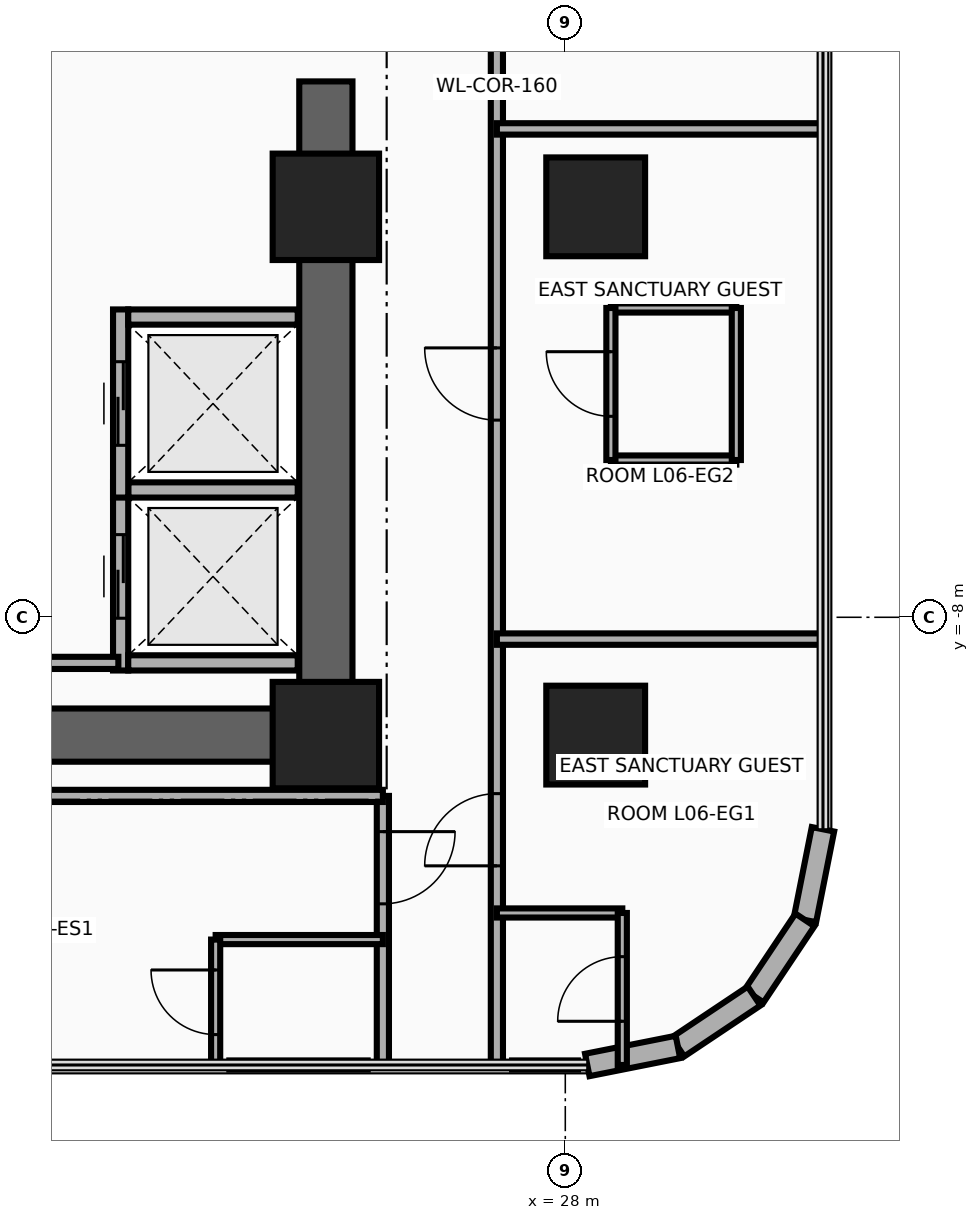
"""IFC4 building model, lengths in metres.
Left out: names, types, materials, properties, quantities, classifications, styles, units other than length and angle.
Written with IfcOpenShell. Run it as: python <this file> out.ifc"""

import sys

from ifc_helpers import new_model, si_unit, direction, frame, frame_2d, origin, origin_2d, place, context, subcontext, project, spatial, rectangle, circle, extrude, source, transform, mapped, element, fill, save


model = new_model("IFC4")
c1 = context("Model", 3, precision=1e-05, world=origin(), true_north=direction((0.0, 1.0)))
c2 = subcontext(c1, "Body", "Model", "MODEL_VIEW")
j1 = project(units=[si_unit("LENGTHUNIT", "METRE"), si_unit("PLANEANGLEUNIT", "RADIAN")], contexts=[c1])
p1 = place(None, origin())
s1 = spatial("IfcSite", under=j1, at=p1, CompositionType="ELEMENT")
p2 = place(p1, origin())
s2 = spatial("IfcBuilding", under=s1, at=p2, CompositionType="ELEMENT")
p3 = place(p2, frame((0.0, 0.0, 29.7)))
s3 = spatial("IfcBuildingStorey", under=s2, at=p3, CompositionType="ELEMENT", Elevation=29.7)
p4 = place(p3, frame((24.85, -9.9, 0.0), z_axis=(0.0, 0.0, 1.0), x_axis=(0.0, 1.0, 0.0)))
e1 = element("IfcWall", 1, at=p4, inside=s3, PredefinedType="SHEAR", context=c2, shape_type="SweptSolid", body=[
    extrude(rectangle(XDim=8.95, YDim=0.7, at=frame_2d((4.475, 0.0))), origin(), (0.0, 0.0, 1.0), 3.46),
])
p5 = place(p3, frame((15.85, -9.55, 0.0), z_axis=(0.0, 0.0, 1.0), x_axis=(1.0, 0.0, 0.0)))
e2 = element("IfcWall", 2, at=p5, inside=s3, PredefinedType="SHEAR", context=c2, shape_type="SweptSolid", body=[
    extrude(rectangle(XDim=9.0, YDim=0.7, at=frame_2d((4.5, 0.0))), origin(), (0.0, 0.0, 1.0), 3.46),
])
m1 = source(origin(), c2, "Body", "SweptSolid", [
    extrude(rectangle(XDim=1.4, YDim=1.4, at=origin_2d()), origin(), (0.0, 0.0, 1.0), 3.7),
])
p6 = place(p3, frame((24.85, -9.55, 0.0), z_axis=(0.0, 0.0, 1.0), x_axis=(1.0, 0.0, 0.0)))
e3 = element("IfcColumn", 3, at=p6, inside=s3, PredefinedType="COLUMN", context=c2, shape_type="MappedRepresentation", body=[
    mapped(m1, transform((0.0, 0.0, 0.0), x_axis=(1.0, 0.0, 0.0), y_axis=(0.0, 1.0, 0.0), z_axis=(0.0, 0.0, 1.0), scale=1.0)),
])
m2 = source(origin(), c2, "Body", "SweptSolid", [
    extrude(circle(Radius=0.65, at=origin_2d()), origin(), (0.0, 0.0, 1.0), 3.7),
])
p7 = place(p3, frame((28.4, -9.55, 0.0), z_axis=(0.0, 0.0, 1.0), x_axis=(1.0, 0.0, 0.0)))
e4 = element("IfcColumn", 4, at=p7, inside=s3, PredefinedType="COLUMN", context=c2, shape_type="MappedRepresentation", body=[
    mapped(m2, transform((0.0, 0.0, 0.0), x_axis=(1.0, 0.0, 0.0), y_axis=(0.0, 1.0, 0.0), z_axis=(0.0, 0.0, 1.0), scale=1.0)),
])
p8 = place(p3, frame((24.85, -2.6, 0.0), z_axis=(0.0, 0.0, 1.0), x_axis=(1.0, 0.0, 0.0)))
e5 = element("IfcColumn", 5, at=p8, inside=s3, PredefinedType="COLUMN", context=c2, shape_type="MappedRepresentation", body=[
    mapped(m1, transform((0.0, 0.0, 0.0), x_axis=(1.0, 0.0, 0.0), y_axis=(0.0, 1.0, 0.0), z_axis=(0.0, 0.0, 1.0), scale=1.0)),
])
p9 = place(p3, frame((28.4, -2.6, 0.0), z_axis=(0.0, 0.0, 1.0), x_axis=(1.0, 0.0, 0.0)))
e6 = element("IfcColumn", 6, at=p9, inside=s3, PredefinedType="COLUMN", context=c2, shape_type="MappedRepresentation", body=[
    mapped(m2, transform((0.0, 0.0, 0.0), x_axis=(1.0, 0.0, 0.0), y_axis=(0.0, 1.0, 0.0), z_axis=(0.0, 0.0, 1.0), scale=1.0)),
])
p10 = place(p3, frame((31.39, -10.789, 0.0), z_axis=(0.0, 0.0, 1.0), x_axis=(-0.194996050505, -0.980804027463, 0.0)))
e7 = element("IfcWall", 7, at=p10, inside=s3, PredefinedType="SOLIDWALL", context=c2, shape_type="SweptSolid", body=[
    extrude(rectangle(XDim=1.216, YDim=0.3, at=frame_2d((0.608, 0.0))), origin(), (0.0, 0.0, 1.0), 3.46),
])
for number, where, z_axis, x_axis in (
    (8, (31.153, -11.982, 0.0), (0.0, 0.0, 1.0), (-0.556, -0.831, 0.0)),
    (9, (30.483, -12.983, 0.0), (0.0, 0.0, 1.0), (-0.831, -0.556, 0.0)),
):
    element("IfcWall", number, at=place(p3, frame(where, z_axis=z_axis, x_axis=x_axis)), inside=s3, PredefinedType="SOLIDWALL", context=c2, shape_type="SweptSolid", body=[
        extrude(rectangle(XDim=1.205, YDim=0.3, at=frame_2d((0.603, 0.0))), origin(), (0.0, 0.0, 1.0), 3.46),
    ])
p11 = place(p3, frame((29.482, -13.653, 0.0), z_axis=(0.0, 0.0, 1.0), x_axis=(-0.980804027463, -0.194996050505, 0.0)))
e10 = element("IfcWall", 10, at=p11, inside=s3, PredefinedType="SOLIDWALL", context=c2, shape_type="SweptSolid", body=[
    extrude(rectangle(XDim=1.216, YDim=0.3, at=frame_2d((0.608, 0.0))), origin(), (0.0, 0.0, 1.0), 3.46),
])
p12 = place(p3, frame((22.15, -8.7, 0.0), z_axis=(0.0, 0.0, 1.0), x_axis=(0.0, 1.0, 0.0)))
e11 = element("IfcWall", 11, at=p12, inside=s3, PredefinedType="MOVABLE", context=c2, shape_type="SweptSolid", body=[
    extrude(rectangle(XDim=2.475, YDim=0.2, at=frame_2d((1.237, 0.0))), origin(), (0.0, 0.0, 1.0), 3.46),
])
p13 = place(p12, frame((0.688, 0.0, 0.0)))
e12 = element("IfcOpeningElement", 12, at=p13, cuts=e11, PredefinedType="OPENING", context=c2, shape_type="SweptSolid", body=[
    extrude(rectangle(XDim=1.1, YDim=2.1, at=frame_2d((0.55, 1.05))), frame((0.0, 0.115, 0.0), z_axis=(0.0, -1.0, 0.0), x_axis=(1.0, 0.0, 0.0)), (0.0, 0.0, 1.0), 0.23),
])
for number, where, z_axis, x_axis in (
    (13, (22.25, -8.6, 0.0), (0.0, 0.0, 1.0), (1.0, 0.0, 0.0)),
    (14, (22.25, -6.325, 0.0), (0.0, 0.0, 1.0), (1.0, 0.0, 0.0)),
):
    element("IfcWall", number, at=place(p3, frame(where, z_axis=z_axis, x_axis=x_axis)), inside=s3, PredefinedType="MOVABLE", context=c2, shape_type="SweptSolid", body=[
        extrude(rectangle(XDim=2.23, YDim=0.2, at=frame_2d((1.115, 0.0))), origin(), (0.0, 0.0, 1.0), 3.46),
    ])
p14 = place(p3, frame((22.15, -6.425, 0.0), z_axis=(0.0, 0.0, 1.0), x_axis=(0.0, 1.0, 0.0)))
e15 = element("IfcWall", 15, at=p14, inside=s3, PredefinedType="MOVABLE", context=c2, shape_type="SweptSolid", body=[
    extrude(rectangle(XDim=2.475, YDim=0.2, at=frame_2d((1.238, 0.0))), origin(), (0.0, 0.0, 1.0), 3.46),
])
p15 = place(p14, frame((0.688, 0.0, 0.0)))
e16 = element("IfcOpeningElement", 16, at=p15, cuts=e15, PredefinedType="OPENING", context=c2, shape_type="SweptSolid", body=[
    extrude(rectangle(XDim=1.1, YDim=2.1, at=frame_2d((0.55, 1.05))), frame((0.0, 0.115, 0.0), z_axis=(0.0, -1.0, 0.0), x_axis=(1.0, 0.0, 0.0)), (0.0, 0.0, 1.0), 0.23),
])
p16 = place(p3, frame((22.25, -4.05, 0.0), z_axis=(0.0, 0.0, 1.0), x_axis=(1.0, 0.0, 0.0)))
e17 = element("IfcWall", 17, at=p16, inside=s3, PredefinedType="MOVABLE", context=c2, shape_type="SweptSolid", body=[
    extrude(rectangle(XDim=2.23, YDim=0.2, at=frame_2d((1.115, 0.0))), origin(), (0.0, 0.0, 1.0), 3.46),
])
p17 = place(p3, frame((20.3, -8.6, 0.0), z_axis=(0.0, 0.0, 1.0), x_axis=(1.0, 0.0, 0.0)))
e18 = element("IfcWall", 18, at=p17, inside=s3, PredefinedType="PARTITIONING", context=c2, shape_type="SweptSolid", body=[
    extrude(rectangle(XDim=1.82, YDim=0.16, at=frame_2d((0.91, 0.0))), origin(), (0.0, 0.0, 1.0), 3.46),
])
p18 = place(p3, frame((25.6, -13.89, 0.0), z_axis=(0.0, 0.0, 1.0), x_axis=(0.0, 1.0, 0.0)))
e19 = element("IfcWall", 19, at=p18, inside=s3, PredefinedType="PARTITIONING", context=c2, shape_type="SweptSolid", body=[
    extrude(rectangle(XDim=3.54, YDim=0.16, at=frame_2d((1.77, 0.0))), origin(), (0.0, 0.0, 1.0), 3.46),
])
p19 = place(p18, frame((2.12, 0.0, 0.0)))
e20 = element("IfcOpeningElement", 20, at=p19, cuts=e19, PredefinedType="OPENING", context=c2, shape_type="SweptSolid", body=[
    extrude(rectangle(XDim=0.95, YDim=2.15, at=frame_2d((0.475, 1.075))), frame((0.0, 0.095, 0.0), z_axis=(0.0, -1.0, 0.0), x_axis=(1.0, 0.0, 0.0)), (0.0, 0.0, 1.0), 0.19),
])
p20 = place(p3, frame((13.41, -10.35, 0.0), z_axis=(0.0, 0.0, 1.0), x_axis=(1.0, 0.0, 0.0)))
e21 = element("IfcWall", 21, at=p20, inside=s3, PredefinedType="PARTITIONING", context=c2, shape_type="SweptSolid", body=[
    extrude(rectangle(XDim=12.19, YDim=0.16, at=frame_2d((6.095, 0.0))), origin(), (0.0, 0.0, 1.0), 3.46),
])
p21 = place(p3, frame((23.4, -12.24, 0.0), z_axis=(0.0, 0.0, 1.0), x_axis=(1.0, 0.0, 0.0)))
e22 = element("IfcWall", 22, at=p21, inside=s3, PredefinedType="PARTITIONING", context=c2, shape_type="SweptSolid", body=[
    extrude(rectangle(XDim=2.2, YDim=0.12, at=frame_2d((1.1, 0.0))), origin(), (0.0, 0.0, 1.0), 3.46),
])
p22 = place(p3, frame((23.4, -13.89, 0.0), z_axis=(0.0, 0.0, 1.0), x_axis=(0.0, 1.0, 0.0)))
e23 = element("IfcWall", 23, at=p22, inside=s3, PredefinedType="PARTITIONING", context=c2, shape_type="SweptSolid", body=[
    extrude(rectangle(XDim=1.65, YDim=0.12, at=frame_2d((0.825, 0.0))), origin(), (0.0, 0.0, 1.0), 3.46),
])
p23 = place(p22, frame((0.4, 0.0, 0.0)))
e24 = element("IfcOpeningElement", 24, at=p23, cuts=e23, PredefinedType="OPENING", context=c2, shape_type="SweptSolid", body=[
    extrude(rectangle(XDim=0.85, YDim=2.1, at=frame_2d((0.425, 1.05))), frame((0.0, 0.075, 0.0), z_axis=(0.0, -1.0, 0.0), x_axis=(1.0, 0.0, 0.0)), (0.0, 0.0, 1.0), 0.15),
])
p24 = place(p3, frame((23.58, -13.89, 0.0), z_axis=(0.0, 0.0, 1.0), x_axis=(1.0, 0.0, 0.0)))
e25 = element("IfcWall", 25, at=p24, inside=s3, PredefinedType="PARTITIONING", context=c2, shape_type="SweptSolid", body=[
    extrude(rectangle(XDim=1.82, YDim=0.12, at=frame_2d((0.91, 0.0))), origin(), (0.0, 0.0, 1.0), 3.46),
])
p25 = place(p3, frame((27.1, -13.89, 0.0), z_axis=(0.0, 0.0, 1.0), x_axis=(0.0, 1.0, 0.0)))
e26 = element("IfcWall", 26, at=p25, inside=s3, PredefinedType="PARTITIONING", context=c2, shape_type="SweptSolid", body=[
    extrude(rectangle(XDim=25.74, YDim=0.16, at=frame_2d((12.87, 0.0))), origin(), (0.0, 0.0, 1.0), 2.583),
])
p26 = place(p25, frame((2.62, 0.0, 0.0)))
e27 = element("IfcOpeningElement", 27, at=p26, cuts=e26, PredefinedType="OPENING", context=c2, shape_type="SweptSolid", body=[
    extrude(rectangle(XDim=0.95, YDim=2.15, at=frame_2d((0.475, 1.075))), frame((0.0, 0.095, 0.0), z_axis=(0.0, -1.0, 0.0), x_axis=(1.0, 0.0, 0.0)), (0.0, 0.0, 1.0), 0.19),
])
p27 = place(p25, frame((8.484, 0.0, 0.0)))
e28 = element("IfcOpeningElement", 28, at=p27, cuts=e26, PredefinedType="OPENING", context=c2, shape_type="SweptSolid", body=[
    extrude(rectangle(XDim=0.95, YDim=2.15, at=frame_2d((0.475, 1.075))), frame((0.0, 0.095, 0.0), z_axis=(0.0, -1.0, 0.0), x_axis=(1.0, 0.0, 0.0)), (0.0, 0.0, 1.0), 0.19),
])
p28 = place(p25, frame((14.197, 0.0, 0.0)))
e29 = element("IfcOpeningElement", 29, at=p28, cuts=e26, PredefinedType="OPENING", context=c2, shape_type="SweptSolid", body=[
    extrude(rectangle(XDim=0.95, YDim=2.15, at=frame_2d((0.475, 1.075))), frame((0.0, 0.095, 0.0), z_axis=(0.0, -1.0, 0.0), x_axis=(1.0, 0.0, 0.0)), (0.0, 0.0, 1.0), 0.19),
])
p29 = place(p25, frame((21.648, 0.0, 0.0)))
e30 = element("IfcOpeningElement", 30, at=p29, cuts=e26, PredefinedType="OPENING", context=c2, shape_type="SweptSolid", body=[
    extrude(rectangle(XDim=0.95, YDim=2.15, at=frame_2d((0.475, 1.075))), frame((0.0, 0.095, 0.0), z_axis=(0.0, -1.0, 0.0), x_axis=(1.0, 0.0, 0.0)), (0.0, 0.0, 1.0), 0.19),
])
for number, where, z_axis, x_axis in (
    (31, (27.1, -8.287, 0.0), (0.0, 0.0, 1.0), (1.0, 0.0, 0.0)),
    (32, (27.1, -1.575, 0.0), (0.0, 0.0, 1.0), (1.0, 0.0, 0.0)),
):
    element("IfcWall", number, at=place(p3, frame(where, z_axis=z_axis, x_axis=x_axis)), inside=s3, PredefinedType="PARTITIONING", context=c2, shape_type="SweptSolid", body=[
        extrude(rectangle(XDim=4.29, YDim=0.15, at=frame_2d((2.145, 0.0))), origin(), (0.0, 0.0, 1.0), 2.896),
    ])
p30 = place(p3, frame((27.1, -11.89, 0.0), z_axis=(0.0, 0.0, 1.0), x_axis=(1.0, 0.0, 0.0)))
e33 = element("IfcWall", 33, at=p30, inside=s3, PredefinedType="PARTITIONING", context=c2, shape_type="SweptSolid", body=[
    extrude(rectangle(XDim=1.65, YDim=0.12, at=frame_2d((0.825, 0.0))), origin(), (0.0, 0.0, 1.0), 3.46),
])
p31 = place(p3, frame((28.75, -13.89, 0.0), z_axis=(0.0, 0.0, 1.0), x_axis=(0.0, 1.0, 0.0)))
e34 = element("IfcWall", 34, at=p31, inside=s3, PredefinedType="PARTITIONING", context=c2, shape_type="SweptSolid", body=[
    extrude(rectangle(XDim=2.0, YDim=0.12, at=frame_2d((1.0, 0.0))), origin(), (0.0, 0.0, 1.0), 3.46),
])
p32 = place(p31, frame((0.575, 0.0, 0.0)))
e35 = element("IfcOpeningElement", 35, at=p32, cuts=e34, PredefinedType="OPENING", context=c2, shape_type="SweptSolid", body=[
    extrude(rectangle(XDim=0.85, YDim=2.1, at=frame_2d((0.425, 1.05))), frame((0.0, 0.075, 0.0), z_axis=(0.0, -1.0, 0.0), x_axis=(1.0, 0.0, 0.0)), (0.0, 0.0, 1.0), 0.15),
])
p33 = place(p3, frame((27.3, -13.89, 0.0), z_axis=(0.0, 0.0, 1.0), x_axis=(1.0, 0.0, 0.0)))
e36 = element("IfcWall", 36, at=p33, inside=s3, PredefinedType="PARTITIONING", context=c2, shape_type="SweptSolid", body=[
    extrude(rectangle(XDim=0.867, YDim=0.12, at=frame_2d((0.433, 0.0))), origin(), (0.0, 0.0, 1.0), 3.46),
])
for number, where, z_axis, x_axis in (
    (37, (28.6, -5.931, 0.0), (0.0, 0.0, 1.0), (1.0, 0.0, 0.0)),
    (38, (28.6, -3.931, 0.0), (0.0, 0.0, 1.0), (1.0, 0.0, 0.0)),
):
    element("IfcWall", number, at=place(p3, frame(where, z_axis=z_axis, x_axis=x_axis)), inside=s3, PredefinedType="PARTITIONING", context=c2, shape_type="SweptSolid", body=[
        extrude(rectangle(XDim=1.65, YDim=0.12, at=frame_2d((0.825, 0.0))), origin(), (0.0, 0.0, 1.0), 3.46),
    ])
p34 = place(p3, frame((30.25, -5.931, 0.0), z_axis=(0.0, 0.0, 1.0), x_axis=(0.0, 1.0, 0.0)))
e39 = element("IfcWall", 39, at=p34, inside=s3, PredefinedType="PARTITIONING", context=c2, shape_type="SweptSolid", body=[
    extrude(rectangle(XDim=2.0, YDim=0.12, at=frame_2d((1.0, 0.0))), origin(), (0.0, 0.0, 1.0), 3.46),
])
p35 = place(p3, frame((28.6, -5.931, 0.0), z_axis=(0.0, 0.0, 1.0), x_axis=(0.0, 1.0, 0.0)))
e40 = element("IfcWall", 40, at=p35, inside=s3, PredefinedType="PARTITIONING", context=c2, shape_type="SweptSolid", body=[
    extrude(rectangle(XDim=2.0, YDim=0.12, at=frame_2d((1.0, 0.0))), origin(), (0.0, 0.0, 1.0), 3.46),
])
p36 = place(p35, frame((0.575, 0.0, 0.0)))
e41 = element("IfcOpeningElement", 41, at=p36, cuts=e40, PredefinedType="OPENING", context=c2, shape_type="SweptSolid", body=[
    extrude(rectangle(XDim=0.85, YDim=2.1, at=frame_2d((0.425, 1.05))), frame((0.0, 0.075, 0.0), z_axis=(0.0, -1.0, 0.0), x_axis=(1.0, 0.0, 0.0)), (0.0, 0.0, 1.0), 0.15),
])
p37 = place(p13, origin())
e42 = element("IfcDoor", 42, at=p37, inside=s3, OperationType="DOUBLE_DOOR_SLIDING", PredefinedType="DOOR", context=c2, shape_type="SweptSolid", body=[
    extrude(rectangle(XDim=1.1, YDim=2.1, at=frame_2d((0.55, 1.05))), frame((0.0, 0.025, 0.0), z_axis=(0.0, -1.0, 0.0), x_axis=(1.0, 0.0, 0.0)), (0.0, 0.0, 1.0), 0.05),
])
fill(e12, e42)
p38 = place(p15, origin())
e43 = element("IfcDoor", 43, at=p38, inside=s3, OperationType="DOUBLE_DOOR_SLIDING", PredefinedType="DOOR", context=c2, shape_type="SweptSolid", body=[
    extrude(rectangle(XDim=1.1, YDim=2.1, at=frame_2d((0.55, 1.05))), frame((0.0, 0.025, 0.0), z_axis=(0.0, -1.0, 0.0), x_axis=(1.0, 0.0, 0.0)), (0.0, 0.0, 1.0), 0.05),
])
fill(e16, e43)
p39 = place(p19, frame((0.95, 0.0, 0.0), z_axis=(0.0, 0.0, 1.0), x_axis=(-1.0, 0.0, 0.0)))
e44 = element("IfcDoor", 44, at=p39, inside=s3, OperationType="SINGLE_SWING_LEFT", PredefinedType="DOOR", context=c2, shape_type="SweptSolid", body=[
    extrude(rectangle(XDim=0.95, YDim=2.15, at=frame_2d((0.475, 1.075))), frame((0.0, 0.025, 0.0), z_axis=(0.0, -1.0, 0.0), x_axis=(1.0, 0.0, 0.0)), (0.0, 0.0, 1.0), 0.05),
])
fill(e20, e44)
p40 = place(p23, origin())
e45 = element("IfcDoor", 45, at=p40, inside=s3, OperationType="SINGLE_SWING_RIGHT", PredefinedType="DOOR", context=c2, shape_type="SweptSolid", body=[
    extrude(rectangle(XDim=0.85, YDim=2.1, at=frame_2d((0.425, 1.05))), frame((0.0, 0.025, 0.0), z_axis=(0.0, -1.0, 0.0), x_axis=(1.0, 0.0, 0.0)), (0.0, 0.0, 1.0), 0.05),
])
fill(e24, e45)
p41 = place(p26, origin())
e46 = element("IfcDoor", 46, at=p41, inside=s3, OperationType="SINGLE_SWING_RIGHT", PredefinedType="DOOR", context=c2, shape_type="SweptSolid", body=[
    extrude(rectangle(XDim=0.95, YDim=2.15, at=frame_2d((0.475, 1.075))), frame((0.0, 0.025, 0.0), z_axis=(0.0, -1.0, 0.0), x_axis=(1.0, 0.0, 0.0)), (0.0, 0.0, 1.0), 0.05),
])
fill(e27, e46)
p42 = place(p32, origin())
e47 = element("IfcDoor", 47, at=p42, inside=s3, OperationType="SINGLE_SWING_LEFT", PredefinedType="DOOR", context=c2, shape_type="SweptSolid", body=[
    extrude(rectangle(XDim=0.85, YDim=2.1, at=frame_2d((0.425, 1.05))), frame((0.0, 0.025, 0.0), z_axis=(0.0, -1.0, 0.0), x_axis=(1.0, 0.0, 0.0)), (0.0, 0.0, 1.0), 0.05),
])
fill(e35, e47)
p43 = place(p27, origin())
e48 = element("IfcDoor", 48, at=p43, inside=s3, OperationType="SINGLE_SWING_RIGHT", PredefinedType="DOOR", context=c2, shape_type="SweptSolid", body=[
    extrude(rectangle(XDim=0.95, YDim=2.15, at=frame_2d((0.475, 1.075))), frame((0.0, 0.025, 0.0), z_axis=(0.0, -1.0, 0.0), x_axis=(1.0, 0.0, 0.0)), (0.0, 0.0, 1.0), 0.05),
])
fill(e28, e48)
p44 = place(p36, origin())
e49 = element("IfcDoor", 49, at=p44, inside=s3, OperationType="SINGLE_SWING_LEFT", PredefinedType="DOOR", context=c2, shape_type="SweptSolid", body=[
    extrude(rectangle(XDim=0.85, YDim=2.1, at=frame_2d((0.425, 1.05))), frame((0.0, 0.025, 0.0), z_axis=(0.0, -1.0, 0.0), x_axis=(1.0, 0.0, 0.0)), (0.0, 0.0, 1.0), 0.05),
])
fill(e41, e49)
save(model, sys.argv[1])
